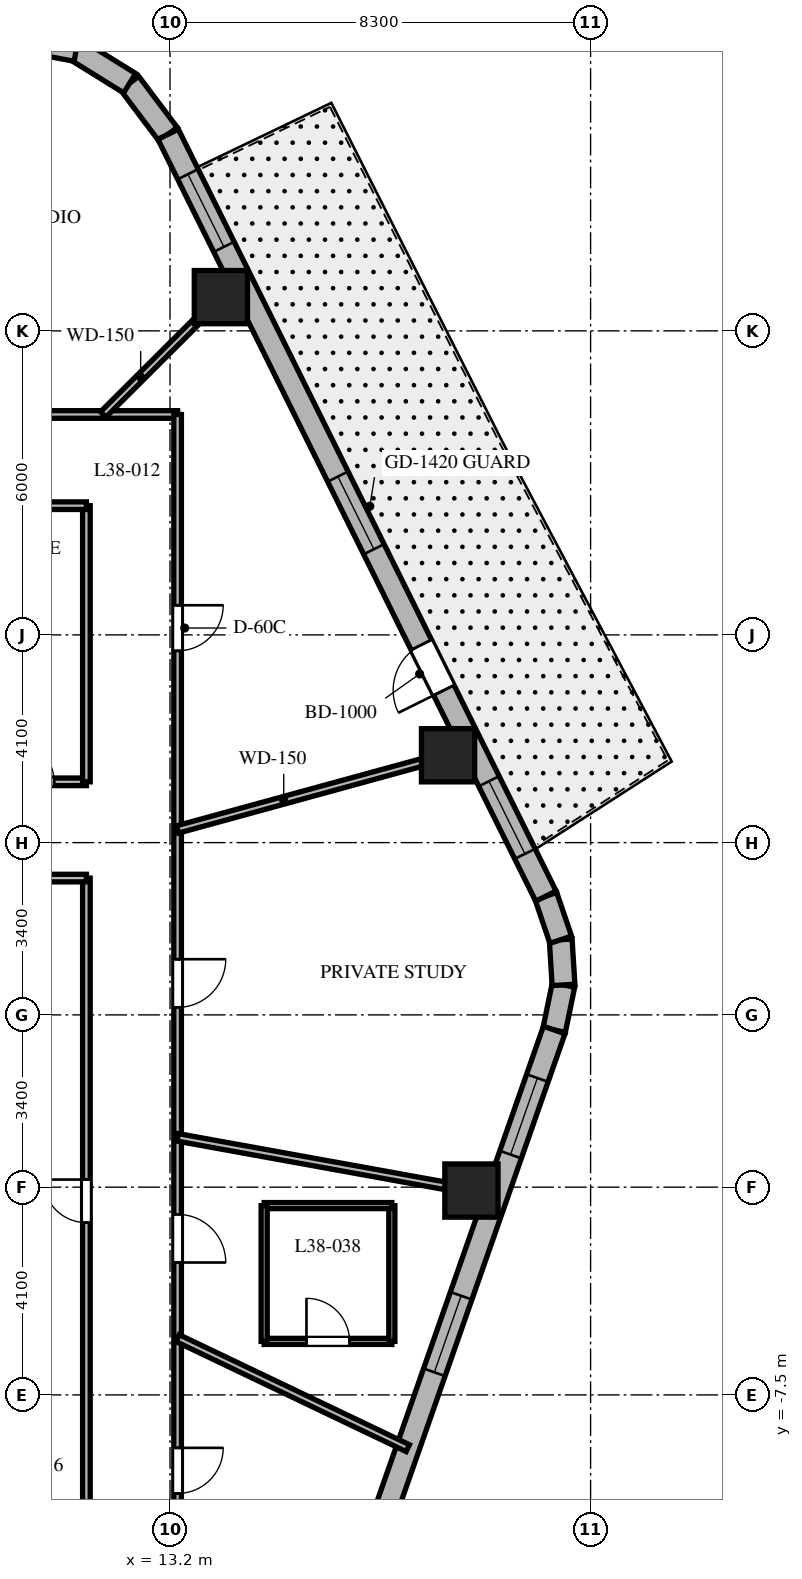
"""IFC4 building model, lengths in metres.
Left out: names, types, materials, properties, quantities, classifications, styles, units other than length and angle.
Written with IfcOpenShell. Run it as: python <this file> out.ifc"""

import sys

from ifc_helpers import new_model, si_unit, direction, frame, frame_2d, origin, origin_2d, place, context, subcontext, project, spatial, rectangle, extrude, element, fill, save


model = new_model("IFC4")
c1 = context("Model", 3, precision=1e-05, world=origin(), true_north=direction((0.0, 1.0)))
c2 = subcontext(c1, "Body", "Model", "MODEL_VIEW")
j1 = project(units=[si_unit("LENGTHUNIT", "METRE"), si_unit("PLANEANGLEUNIT", "RADIAN")], contexts=[c1])
p1 = place(None, origin())
s1 = spatial("IfcSite", under=j1, at=p1, CompositionType="ELEMENT")
p2 = place(p1, origin())
s2 = spatial("IfcBuilding", under=s1, at=p2, CompositionType="ELEMENT")
p3 = place(p2, frame((0.0, 0.0, 155.4)))
s3 = spatial("IfcBuildingStorey", under=s2, at=p3, CompositionType="ELEMENT", Elevation=155.4)
for number, where, z_axis, x_axis in (
    (1, (19.148, -3.467, 0.0), (0.0, 0.0, 1.0), (1.0, 0.0, 0.0)),
    (2, (18.687, 5.124, 0.0), (0.0, 0.0, 1.0), (1.0, 0.0, 0.0)),
    (3, (14.204, 14.166, 0.0), (0.0, 0.0, 1.0), (1.0, 0.0, 0.0)),
):
    element("IfcColumn", number, at=place(p3, frame(where, z_axis=z_axis, x_axis=x_axis)), inside=s3, PredefinedType="COLUMN", context=c2, shape_type="SweptSolid", body=[
        extrude(rectangle(XDim=1.05, YDim=1.05, at=origin_2d()), origin(), (0.0, 0.0, 1.0), 3.7),
    ])
p4 = place(p3, frame((20.782, -0.298, 0.0), z_axis=(0.0, 0.0, 1.0), x_axis=(0.202570068411, 0.979267771033, 0.0)))
e4 = element("IfcWall", 4, at=p4, inside=s3, PredefinedType="SOLIDWALL", context=c2, shape_type="SweptSolid", body=[
    extrude(rectangle(XDim=0.909, YDim=0.45, at=frame_2d((0.454, 0.0))), origin(), (0.0, 0.0, 1.0), 3.4),
])
p5 = place(p3, frame((20.966, 0.592, 0.0), z_axis=(0.0, 0.0, 1.0), x_axis=(-0.061748898935, 0.998091715966, 0.0)))
e5 = element("IfcWall", 5, at=p5, inside=s3, PredefinedType="SOLIDWALL", context=c2, shape_type="SweptSolid", body=[
    extrude(rectangle(XDim=0.894, YDim=0.45, at=frame_2d((0.447, 0.0))), origin(), (0.0, 0.0, 1.0), 3.4),
])
p6 = place(p3, frame((20.911, 1.484, 0.0), z_axis=(0.0, 0.0, 1.0), x_axis=(-0.321623334353, 0.946867694453, 0.0)))
e6 = element("IfcWall", 6, at=p6, inside=s3, PredefinedType="SOLIDWALL", context=c2, shape_type="SweptSolid", body=[
    extrude(rectangle(XDim=0.909, YDim=0.45, at=frame_2d((0.454, 0.0))), origin(), (0.0, 0.0, 1.0), 3.4),
])
p7 = place(p3, frame((13.162, 17.381, 0.0), z_axis=(0.0, 0.0, 1.0), x_axis=(-0.601515770517, 0.798860925205, 0.0)))
e7 = element("IfcWall", 7, at=p7, inside=s3, PredefinedType="SOLIDWALL", context=c2, shape_type="SweptSolid", body=[
    extrude(rectangle(XDim=1.262, YDim=0.45, at=frame_2d((0.631, 0.0))), origin(), (0.0, 0.0, 1.0), 3.4),
])
p8 = place(p3, frame((12.403, 18.389, 0.0), z_axis=(0.0, 0.0, 1.0), x_axis=(-0.849795170926, 0.527113049991, 0.0)))
e8 = element("IfcWall", 8, at=p8, inside=s3, PredefinedType="SOLIDWALL", context=c2, shape_type="SweptSolid", body=[
    extrude(rectangle(XDim=1.241, YDim=0.45, at=frame_2d((0.62, 0.0))), origin(), (0.0, 0.0, 1.0), 3.4),
])
p9 = place(p3, frame((11.349, 19.043, 0.0), z_axis=(0.0, 0.0, 1.0), x_axis=(-0.982931267051, 0.183973161772, 0.0)))
e9 = element("IfcWall", 9, at=p9, inside=s3, PredefinedType="SOLIDWALL", context=c2, shape_type="SweptSolid", body=[
    extrude(rectangle(XDim=1.262, YDim=0.45, at=frame_2d((0.631, 0.0))), origin(), (0.0, 0.0, 1.0), 3.4),
])
p10 = place(p3, frame((14.937, -16.993, 0.0), z_axis=(0.0, 0.0, 1.0), x_axis=(0.330431575061, 0.943829949834, 0.0)))
e10 = element("IfcWall", 10, at=p10, inside=s3, PredefinedType="SOLIDWALL", context=c2, shape_type="SweptSolid", body=[
    extrude(rectangle(XDim=17.689, YDim=0.45, at=frame_2d((8.844, 0.0))), origin(), (0.0, 0.0, 1.0), 3.4),
])
p11 = place(p10, frame((0.95, 0.0, 0.8)))
e11 = element("IfcOpeningElement", 11, at=p11, cuts=e10, PredefinedType="OPENING", context=c2, shape_type="SweptSolid", body=[
    extrude(rectangle(XDim=1.6, YDim=1.75, at=frame_2d((0.8, 0.875))), frame((0.0, 0.235, 0.0), z_axis=(0.0, -1.0, 0.0), x_axis=(1.0, 0.0, 0.0)), (0.0, 0.0, 1.0), 0.47),
])
p12 = place(p10, frame((5.605, 0.0, 0.8)))
e12 = element("IfcOpeningElement", 12, at=p12, cuts=e10, PredefinedType="OPENING", context=c2, shape_type="SweptSolid", body=[
    extrude(rectangle(XDim=1.6, YDim=1.75, at=frame_2d((0.8, 0.875))), frame((0.0, 0.235, 0.0), z_axis=(0.0, -1.0, 0.0), x_axis=(1.0, 0.0, 0.0)), (0.0, 0.0, 1.0), 0.47),
])
p13 = place(p10, frame((10.531, 0.0, 0.8)))
e13 = element("IfcOpeningElement", 13, at=p13, cuts=e10, PredefinedType="OPENING", context=c2, shape_type="SweptSolid", body=[
    extrude(rectangle(XDim=1.6, YDim=1.75, at=frame_2d((0.8, 0.875))), frame((0.0, 0.235, 0.0), z_axis=(0.0, -1.0, 0.0), x_axis=(1.0, 0.0, 0.0)), (0.0, 0.0, 1.0), 0.47),
])
p14 = place(p10, frame((15.084, 0.0, 0.8)))
e14 = element("IfcOpeningElement", 14, at=p14, cuts=e10, PredefinedType="OPENING", context=c2, shape_type="SweptSolid", body=[
    extrude(rectangle(XDim=1.6, YDim=1.75, at=frame_2d((0.8, 0.875))), frame((0.0, 0.235, 0.0), z_axis=(0.0, -1.0, 0.0), x_axis=(1.0, 0.0, 0.0)), (0.0, 0.0, 1.0), 0.47),
])
p15 = place(p3, frame((20.618, 2.344, 0.0), z_axis=(0.0, 0.0, 1.0), x_axis=(-0.444243691097, 0.895905990002, 0.0)))
e15 = element("IfcWall", 15, at=p15, inside=s3, PredefinedType="SOLIDWALL", context=c2, shape_type="SweptSolid", body=[
    extrude(rectangle(XDim=16.784, YDim=0.45, at=frame_2d((8.392, 0.0))), origin(), (0.0, 0.0, 1.0), 3.4),
])
p16 = place(p15, frame((4.535, 0.0, 0.0)))
e16 = element("IfcOpeningElement", 16, at=p16, cuts=e15, PredefinedType="OPENING", context=c2, shape_type="SweptSolid", body=[
    extrude(rectangle(XDim=1.0, YDim=2.15, at=frame_2d((0.5, 1.075))), frame((0.0, 0.235, 0.0), z_axis=(0.0, -1.0, 0.0), x_axis=(1.0, 0.0, 0.0)), (0.0, 0.0, 1.0), 0.47),
])
p17 = place(p15, frame((7.642, 0.0, 0.8)))
e17 = element("IfcOpeningElement", 17, at=p17, cuts=e15, PredefinedType="OPENING", context=c2, shape_type="SweptSolid", body=[
    extrude(rectangle(XDim=1.6, YDim=1.75, at=frame_2d((0.8, 0.875))), frame((0.0, 0.235, 0.0), z_axis=(0.0, -1.0, 0.0), x_axis=(1.0, 0.0, 0.0)), (0.0, 0.0, 1.0), 0.47),
])
p18 = place(p15, frame((14.303, 0.0, 0.8)))
e18 = element("IfcOpeningElement", 18, at=p18, cuts=e15, PredefinedType="OPENING", context=c2, shape_type="SweptSolid", body=[
    extrude(rectangle(XDim=1.6, YDim=1.75, at=frame_2d((0.8, 0.875))), frame((0.0, 0.235, 0.0), z_axis=(0.0, -1.0, 0.0), x_axis=(1.0, 0.0, 0.0)), (0.0, 0.0, 1.0), 0.47),
])
p19 = place(p15, frame((0.931, 0.0, 0.8)))
e19 = element("IfcOpeningElement", 19, at=p19, cuts=e15, PredefinedType="OPENING", context=c2, shape_type="SweptSolid", body=[
    extrude(rectangle(XDim=1.6, YDim=1.75, at=frame_2d((0.8, 0.875))), frame((0.0, 0.235, 0.0), z_axis=(0.0, -1.0, 0.0), x_axis=(1.0, 0.0, 0.0)), (0.0, 0.0, 1.0), 0.47),
])
p20 = place(p3, frame((-13.35, 11.85, 0.0), z_axis=(0.0, 0.0, 1.0), x_axis=(1.0, 0.0, 0.0)))
e20 = element("IfcWall", 20, at=p20, inside=s3, PredefinedType="PARTITIONING", context=c2, shape_type="SweptSolid", body=[
    extrude(rectangle(XDim=26.7, YDim=0.15, at=frame_2d((13.35, 0.0))), origin(), (0.0, 0.0, 1.0), 2.84),
])
p21 = place(p20, frame((20.682, 0.0, 0.0)))
e21 = element("IfcOpeningElement", 21, at=p21, cuts=e20, PredefinedType="OPENING", context=c2, shape_type="SweptSolid", body=[
    extrude(rectangle(XDim=0.95, YDim=2.03, at=frame_2d((0.475, 1.015))), frame((0.0, 0.085, 0.0), z_axis=(0.0, -1.0, 0.0), x_axis=(1.0, 0.0, 0.0)), (0.0, 0.0, 1.0), 0.17),
])
p22 = place(p20, frame((14.229, 0.0, 0.0)))
e22 = element("IfcOpeningElement", 22, at=p22, cuts=e20, PredefinedType="OPENING", context=c2, shape_type="SweptSolid", body=[
    extrude(rectangle(XDim=0.95, YDim=2.03, at=frame_2d((0.475, 1.015))), frame((0.0, 0.085, 0.0), z_axis=(0.0, -1.0, 0.0), x_axis=(1.0, 0.0, 0.0)), (0.0, 0.0, 1.0), 0.17),
])
p23 = place(p20, frame((10.075, 0.0, 0.0)))
e23 = element("IfcOpeningElement", 23, at=p23, cuts=e20, PredefinedType="OPENING", context=c2, shape_type="SweptSolid", body=[
    extrude(rectangle(XDim=0.95, YDim=2.03, at=frame_2d((0.475, 1.015))), frame((0.0, 0.085, 0.0), z_axis=(0.0, -1.0, 0.0), x_axis=(1.0, 0.0, 0.0)), (0.0, 0.0, 1.0), 0.17),
])
p24 = place(p20, frame((3.995, 0.0, 0.0)))
e24 = element("IfcOpeningElement", 24, at=p24, cuts=e20, PredefinedType="OPENING", context=c2, shape_type="SweptSolid", body=[
    extrude(rectangle(XDim=0.95, YDim=2.03, at=frame_2d((0.475, 1.015))), frame((0.0, 0.085, 0.0), z_axis=(0.0, -1.0, 0.0), x_axis=(1.0, 0.0, 0.0)), (0.0, 0.0, 1.0), 0.17),
])
p25 = place(p3, frame((13.35, 11.85, 0.0), z_axis=(0.0, 0.0, 1.0), x_axis=(0.0, -1.0, 0.0)))
e25 = element("IfcWall", 25, at=p25, inside=s3, PredefinedType="PARTITIONING", context=c2, shape_type="SweptSolid", body=[
    extrude(rectangle(XDim=23.7, YDim=0.15, at=frame_2d((11.85, 0.0))), origin(), (0.0, 0.0, 1.0), 2.84),
])
p26 = place(p25, frame((3.765, 0.0, 0.0)))
e26 = element("IfcOpeningElement", 26, at=p26, cuts=e25, PredefinedType="OPENING", context=c2, shape_type="SweptSolid", body=[
    extrude(rectangle(XDim=0.9, YDim=2.03, at=frame_2d((0.45, 1.015))), frame((0.0, 0.085, 0.0), z_axis=(0.0, -1.0, 0.0), x_axis=(1.0, 0.0, 0.0)), (0.0, 0.0, 1.0), 0.17),
])
p27 = place(p25, frame((20.395, 0.0, 0.0)))
e27 = element("IfcOpeningElement", 27, at=p27, cuts=e25, PredefinedType="OPENING", context=c2, shape_type="SweptSolid", body=[
    extrude(rectangle(XDim=0.9, YDim=2.03, at=frame_2d((0.45, 1.015))), frame((0.0, 0.085, 0.0), z_axis=(0.0, -1.0, 0.0), x_axis=(1.0, 0.0, 0.0)), (0.0, 0.0, 1.0), 0.17),
])
p28 = place(p25, frame((15.787, 0.0, 0.0)))
e28 = element("IfcOpeningElement", 28, at=p28, cuts=e25, PredefinedType="OPENING", context=c2, shape_type="SweptSolid", body=[
    extrude(rectangle(XDim=0.95, YDim=2.03, at=frame_2d((0.475, 1.015))), frame((0.0, 0.085, 0.0), z_axis=(0.0, -1.0, 0.0), x_axis=(1.0, 0.0, 0.0)), (0.0, 0.0, 1.0), 0.17),
])
p29 = place(p25, frame((10.751, 0.0, 0.0)))
e29 = element("IfcOpeningElement", 29, at=p29, cuts=e25, PredefinedType="OPENING", context=c2, shape_type="SweptSolid", body=[
    extrude(rectangle(XDim=0.95, YDim=2.03, at=frame_2d((0.475, 1.015))), frame((0.0, 0.085, 0.0), z_axis=(0.0, -1.0, 0.0), x_axis=(1.0, 0.0, 0.0)), (0.0, 0.0, 1.0), 0.17),
])
p30 = place(p3, frame((11.55, -10.05, 0.0), z_axis=(0.0, 0.0, 1.0), x_axis=(0.0, 1.0, 0.0)))
e30 = element("IfcWall", 30, at=p30, inside=s3, PredefinedType="PARTITIONING", context=c2, shape_type="SweptSolid", body=[
    extrude(rectangle(XDim=12.75, YDim=0.15, at=frame_2d((6.375, 0.0))), origin(), (0.0, 0.0, 1.0), 2.84),
])
p31 = place(p30, frame((5.95, 0.0, 0.0)))
e31 = element("IfcOpeningElement", 31, at=p31, cuts=e30, PredefinedType="OPENING", context=c2, shape_type="SweptSolid", body=[
    extrude(rectangle(XDim=0.85, YDim=2.03, at=frame_2d((0.425, 1.015))), frame((0.0, 0.085, 0.0), z_axis=(0.0, -1.0, 0.0), x_axis=(1.0, 0.0, 0.0)), (0.0, 0.0, 1.0), 0.17),
])
p32 = place(p3, frame((11.55, 2.7, 0.0), z_axis=(0.0, 0.0, 1.0), x_axis=(-1.0, 0.0, 0.0)))
e32 = element("IfcWall", 32, at=p32, inside=s3, PredefinedType="PARTITIONING", context=c2, shape_type="SweptSolid", body=[
    extrude(rectangle(XDim=2.125, YDim=0.15, at=frame_2d((1.062, 0.0))), origin(), (0.0, 0.0, 1.0), 3.4),
])
p33 = place(p3, frame((9.425, 4.6, 0.0), z_axis=(0.0, 0.0, 1.0), x_axis=(1.0, 0.0, 0.0)))
e33 = element("IfcWall", 33, at=p33, inside=s3, PredefinedType="PARTITIONING", context=c2, shape_type="SweptSolid", body=[
    extrude(rectangle(XDim=2.125, YDim=0.15, at=frame_2d((1.062, 0.0))), origin(), (0.0, 0.0, 1.0), 3.4),
])
p34 = place(p33, frame((0.637, 0.0, 0.0)))
e34 = element("IfcOpeningElement", 34, at=p34, cuts=e33, PredefinedType="OPENING", context=c2, shape_type="SweptSolid", body=[
    extrude(rectangle(XDim=0.85, YDim=2.03, at=frame_2d((0.425, 1.015))), frame((0.0, 0.085, 0.0), z_axis=(0.0, -1.0, 0.0), x_axis=(1.0, 0.0, 0.0)), (0.0, 0.0, 1.0), 0.17),
])
p35 = place(p3, frame((11.55, 4.6, 0.0), z_axis=(0.0, 0.0, 1.0), x_axis=(0.0, 1.0, 0.0)))
e35 = element("IfcWall", 35, at=p35, inside=s3, PredefinedType="PARTITIONING", context=c2, shape_type="SweptSolid", body=[
    extrude(rectangle(XDim=5.45, YDim=0.15, at=frame_2d((2.725, 0.0))), origin(), (0.0, 0.0, 1.0), 2.84),
])
p36 = place(p3, frame((11.55, 10.05, 0.0), z_axis=(0.0, 0.0, 1.0), x_axis=(-1.0, 0.0, 0.0)))
e36 = element("IfcWall", 36, at=p36, inside=s3, PredefinedType="PARTITIONING", context=c2, shape_type="SweptSolid", body=[
    extrude(rectangle(XDim=9.65, YDim=0.15, at=frame_2d((4.825, 0.0))), origin(), (0.0, 0.0, 1.0), 2.84),
])
p37 = place(p3, frame((13.35, 3.661, 0.0), z_axis=(0.0, 0.0, 1.0), x_axis=(0.964397145454, 0.264458211898, 0.0)))
e37 = element("IfcWall", 37, at=p37, inside=s3, PredefinedType="PARTITIONING", context=c2, shape_type="SweptSolid", body=[
    extrude(rectangle(XDim=6.039, YDim=0.15, at=frame_2d((3.019, 0.0))), origin(), (0.0, 0.0, 1.0), 2.64),
])
p38 = place(p3, frame((11.882, 11.85, 0.0), z_axis=(0.0, 0.0, 1.0), x_axis=(0.708037373639, 0.706174962407, 0.0)))
e38 = element("IfcWall", 38, at=p38, inside=s3, PredefinedType="PARTITIONING", context=c2, shape_type="SweptSolid", body=[
    extrude(rectangle(XDim=3.802, YDim=0.15, at=frame_2d((1.901, 0.0))), origin(), (0.0, 0.0, 1.0), 2.64),
])
p39 = place(p3, frame((13.35, -6.38, 0.0), z_axis=(0.0, 0.0, 1.0), x_axis=(0.90225728206, -0.431198094812, 0.0)))
e39 = element("IfcWall", 39, at=p39, inside=s3, PredefinedType="PARTITIONING", context=c2, shape_type="SweptSolid", body=[
    extrude(rectangle(XDim=5.035, YDim=0.15, at=frame_2d((2.517, 0.0))), origin(), (0.0, 0.0, 1.0), 2.64),
])
p40 = place(p3, frame((13.35, -2.417, 0.0), z_axis=(0.0, 0.0, 1.0), x_axis=(0.98399796473, -0.178179699761, 0.0)))
e40 = element("IfcWall", 40, at=p40, inside=s3, PredefinedType="PARTITIONING", context=c2, shape_type="SweptSolid", body=[
    extrude(rectangle(XDim=6.393, YDim=0.15, at=frame_2d((3.197, 0.0))), origin(), (0.0, 0.0, 1.0), 2.64),
])
p41 = place(p3, frame((15.058, -6.444, 0.0), z_axis=(0.0, 0.0, 1.0), x_axis=(1.0, 0.0, 0.0)))
e41 = element("IfcWall", 41, at=p41, inside=s3, PredefinedType="PARTITIONING", context=c2, shape_type="SweptSolid", body=[
    extrude(rectangle(XDim=2.52, YDim=0.12, at=frame_2d((1.26, 0.0))), origin(), (0.0, 0.0, 1.0), 2.972),
])
p42 = place(p41, frame((0.835, 0.0, 0.0)))
e42 = element("IfcOpeningElement", 42, at=p42, cuts=e41, PredefinedType="OPENING", context=c2, shape_type="SweptSolid", body=[
    extrude(rectangle(XDim=0.85, YDim=2.03, at=frame_2d((0.425, 1.015))), frame((0.0, 0.07, 0.0), z_axis=(0.0, -1.0, 0.0), x_axis=(1.0, 0.0, 0.0)), (0.0, 0.0, 1.0), 0.14),
])
p43 = place(p3, frame((17.578, -6.444, 0.0), z_axis=(0.0, 0.0, 1.0), x_axis=(0.0, 1.0, 0.0)))
e43 = element("IfcWall", 43, at=p43, inside=s3, PredefinedType="PARTITIONING", context=c2, shape_type="SweptSolid", body=[
    extrude(rectangle(XDim=2.68, YDim=0.12, at=frame_2d((1.34, 0.0))), origin(), (0.0, 0.0, 1.0), 2.84),
])
p44 = place(p3, frame((17.578, -3.764, 0.0), z_axis=(0.0, 0.0, 1.0), x_axis=(-1.0, 0.0, 0.0)))
e44 = element("IfcWall", 44, at=p44, inside=s3, PredefinedType="PARTITIONING", context=c2, shape_type="SweptSolid", body=[
    extrude(rectangle(XDim=2.52, YDim=0.12, at=frame_2d((1.26, 0.0))), origin(), (0.0, 0.0, 1.0), 2.841),
])
p45 = place(p3, frame((15.058, -3.764, 0.0), z_axis=(0.0, 0.0, 1.0), x_axis=(0.0, -1.0, 0.0)))
e45 = element("IfcWall", 45, at=p45, inside=s3, PredefinedType="PARTITIONING", context=c2, shape_type="SweptSolid", body=[
    extrude(rectangle(XDim=2.68, YDim=0.12, at=frame_2d((1.34, 0.0))), origin(), (0.0, 0.0, 1.0), 2.84),
])
p46 = place(p13, origin())
e46 = element("IfcWindow", 46, at=p46, inside=s3, PartitioningType="SINGLE_PANEL", PredefinedType="WINDOW", context=c2, shape_type="SweptSolid", body=[
    extrude(rectangle(XDim=1.6, YDim=1.75, at=frame_2d((0.8, 0.875))), frame((0.0, 0.03, 0.0), z_axis=(0.0, -1.0, 0.0), x_axis=(1.0, 0.0, 0.0)), (0.0, 0.0, 1.0), 0.06),
])
fill(e13, e46)
p47 = place(p14, origin())
e47 = element("IfcWindow", 47, at=p47, inside=s3, PartitioningType="SINGLE_PANEL", PredefinedType="WINDOW", context=c2, shape_type="SweptSolid", body=[
    extrude(rectangle(XDim=1.6, YDim=1.75, at=frame_2d((0.8, 0.875))), frame((0.0, 0.03, 0.0), z_axis=(0.0, -1.0, 0.0), x_axis=(1.0, 0.0, 0.0)), (0.0, 0.0, 1.0), 0.06),
])
fill(e14, e47)
p48 = place(p16, origin())
e48 = element("IfcDoor", 48, at=p48, inside=s3, OperationType="SINGLE_SWING_LEFT", PredefinedType="DOOR", context=c2, shape_type="SweptSolid", body=[
    extrude(rectangle(XDim=1.0, YDim=2.15, at=frame_2d((0.5, 1.075))), frame((0.0, 0.025, 0.0), z_axis=(0.0, -1.0, 0.0), x_axis=(1.0, 0.0, 0.0)), (0.0, 0.0, 1.0), 0.05),
])
fill(e16, e48)
p49 = place(p17, origin())
e49 = element("IfcWindow", 49, at=p49, inside=s3, PartitioningType="SINGLE_PANEL", PredefinedType="WINDOW", context=c2, shape_type="SweptSolid", body=[
    extrude(rectangle(XDim=1.6, YDim=1.75, at=frame_2d((0.8, 0.875))), frame((0.0, 0.03, 0.0), z_axis=(0.0, -1.0, 0.0), x_axis=(1.0, 0.0, 0.0)), (0.0, 0.0, 1.0), 0.06),
])
fill(e17, e49)
p50 = place(p18, origin())
e50 = element("IfcWindow", 50, at=p50, inside=s3, PartitioningType="SINGLE_PANEL", PredefinedType="WINDOW", context=c2, shape_type="SweptSolid", body=[
    extrude(rectangle(XDim=1.6, YDim=1.75, at=frame_2d((0.8, 0.875))), frame((0.0, 0.03, 0.0), z_axis=(0.0, -1.0, 0.0), x_axis=(1.0, 0.0, 0.0)), (0.0, 0.0, 1.0), 0.06),
])
fill(e18, e50)
p51 = place(p19, origin())
e51 = element("IfcWindow", 51, at=p51, inside=s3, PartitioningType="SINGLE_PANEL", PredefinedType="WINDOW", context=c2, shape_type="SweptSolid", body=[
    extrude(rectangle(XDim=1.6, YDim=1.75, at=frame_2d((0.8, 0.875))), frame((0.0, 0.03, 0.0), z_axis=(0.0, -1.0, 0.0), x_axis=(1.0, 0.0, 0.0)), (0.0, 0.0, 1.0), 0.06),
])
fill(e19, e51)
p52 = place(p34, origin())
e52 = element("IfcDoor", 52, at=p52, inside=s3, OperationType="SINGLE_SWING_LEFT", PredefinedType="DOOR", context=c2, shape_type="SweptSolid", body=[
    extrude(rectangle(XDim=0.85, YDim=2.03, at=frame_2d((0.425, 1.015))), frame((0.0, 0.025, 0.0), z_axis=(0.0, -1.0, 0.0), x_axis=(1.0, 0.0, 0.0)), (0.0, 0.0, 1.0), 0.05),
])
fill(e34, e52)
p53 = place(p31, origin())
e53 = element("IfcDoor", 53, at=p53, inside=s3, OperationType="SINGLE_SWING_RIGHT", PredefinedType="DOOR", context=c2, shape_type="SweptSolid", body=[
    extrude(rectangle(XDim=0.85, YDim=2.03, at=frame_2d((0.425, 1.015))), frame((0.0, 0.025, 0.0), z_axis=(0.0, -1.0, 0.0), x_axis=(1.0, 0.0, 0.0)), (0.0, 0.0, 1.0), 0.05),
])
fill(e31, e53)
p54 = place(p26, origin())
e54 = element("IfcDoor", 54, at=p54, inside=s3, OperationType="SINGLE_SWING_LEFT", PredefinedType="DOOR", context=c2, shape_type="SweptSolid", body=[
    extrude(rectangle(XDim=0.9, YDim=2.03, at=frame_2d((0.45, 1.015))), frame((0.0, 0.025, 0.0), z_axis=(0.0, -1.0, 0.0), x_axis=(1.0, 0.0, 0.0)), (0.0, 0.0, 1.0), 0.05),
])
fill(e26, e54)
p55 = place(p27, origin())
e55 = element("IfcDoor", 55, at=p55, inside=s3, OperationType="SINGLE_SWING_LEFT", PredefinedType="DOOR", context=c2, shape_type="SweptSolid", body=[
    extrude(rectangle(XDim=0.9, YDim=2.03, at=frame_2d((0.45, 1.015))), frame((0.0, 0.025, 0.0), z_axis=(0.0, -1.0, 0.0), x_axis=(1.0, 0.0, 0.0)), (0.0, 0.0, 1.0), 0.05),
])
fill(e27, e55)
p56 = place(p28, origin())
e56 = element("IfcDoor", 56, at=p56, inside=s3, OperationType="SINGLE_SWING_RIGHT", PredefinedType="DOOR", context=c2, shape_type="SweptSolid", body=[
    extrude(rectangle(XDim=0.95, YDim=2.03, at=frame_2d((0.475, 1.015))), frame((0.0, 0.025, 0.0), z_axis=(0.0, -1.0, 0.0), x_axis=(1.0, 0.0, 0.0)), (0.0, 0.0, 1.0), 0.05),
])
fill(e28, e56)
p57 = place(p42, origin())
e57 = element("IfcDoor", 57, at=p57, inside=s3, OperationType="SINGLE_SWING_LEFT", PredefinedType="DOOR", context=c2, shape_type="SweptSolid", body=[
    extrude(rectangle(XDim=0.85, YDim=2.03, at=frame_2d((0.425, 1.015))), frame((0.0, 0.025, 0.0), z_axis=(0.0, -1.0, 0.0), x_axis=(1.0, 0.0, 0.0)), (0.0, 0.0, 1.0), 0.05),
])
fill(e42, e57)
p58 = place(p29, origin())
e58 = element("IfcDoor", 58, at=p58, inside=s3, OperationType="SINGLE_SWING_LEFT", PredefinedType="DOOR", context=c2, shape_type="SweptSolid", body=[
    extrude(rectangle(XDim=0.95, YDim=2.03, at=frame_2d((0.475, 1.015))), frame((0.0, 0.025, 0.0), z_axis=(0.0, -1.0, 0.0), x_axis=(1.0, 0.0, 0.0)), (0.0, 0.0, 1.0), 0.05),
])
fill(e29, e58)
save(model, sys.argv[1])
